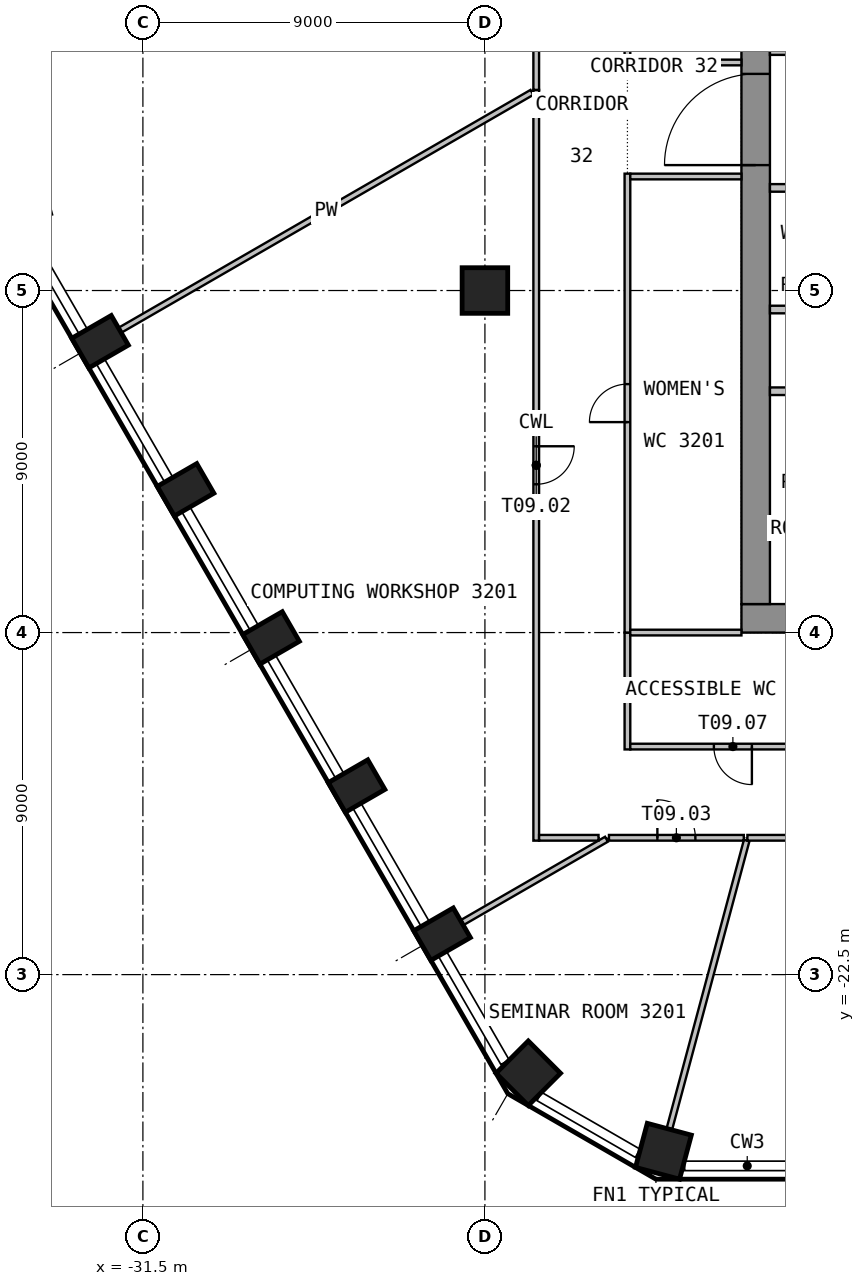
"""IFC4 building model, lengths in metres.
Left out: names, types, materials, properties, quantities, classifications, styles, units other than length and angle.
Written with IfcOpenShell. Run it as: python <this file> out.ifc"""

import sys

from ifc_helpers import new_model, si_unit, direction, frame, frame_2d, origin, origin_2d, place, context, subcontext, project, spatial, rectangle, circle, extrude, element, fill, save


model = new_model("IFC4")
c1 = context("Model", 3, precision=1e-05, world=origin(), true_north=direction((0.0, 1.0)))
c2 = subcontext(c1, "Body", "Model", "MODEL_VIEW")
j1 = project(units=[si_unit("LENGTHUNIT", "METRE"), si_unit("PLANEANGLEUNIT", "RADIAN")], contexts=[c1])
p1 = place(None, origin())
s1 = spatial("IfcSite", under=j1, at=p1, CompositionType="ELEMENT")
p2 = place(p1, origin())
s2 = spatial("IfcBuilding", under=s1, at=p2, CompositionType="ELEMENT")
p3 = place(p2, frame((0.0, 0.0, 132.6)))
s3 = spatial("IfcBuildingStorey", under=s2, at=p3, CompositionType="ELEMENT", Elevation=132.6)
p4 = place(p3, frame((-17.803, -27.148, 0.0), z_axis=(0.0, 0.0, 1.0), x_axis=(0.965925826289, -0.258819045103, 0.0)))
e1 = element("IfcColumn", 1, at=p4, inside=s3, PredefinedType="COLUMN", context=c2, shape_type="SweptSolid", body=[
    extrude(rectangle(XDim=1.2, YDim=1.2, at=origin_2d()), origin(), (0.0, 0.0, 1.0), 3.575),
])
for number, where, z_axis, x_axis in (
    (2, (-32.627, -5.847, 0.0), (0.0, 0.0, 1.0), (0.5, -0.866, 0.0)),
    (3, (-30.377, -9.744, 0.0), (0.0, 0.0, 1.0), (0.5, -0.866, 0.0)),
    (4, (-28.127, -13.641, 0.0), (0.0, 0.0, 1.0), (0.5, -0.866, 0.0)),
    (5, (-25.877, -17.539, 0.0), (0.0, 0.0, 1.0), (0.5, -0.866, 0.0)),
    (6, (-23.627, -21.436, 0.0), (0.0, 0.0, 1.0), (0.5, -0.866, 0.0)),
):
    element("IfcColumn", number, at=place(p3, frame(where, z_axis=z_axis, x_axis=x_axis)), inside=s3, PredefinedType="COLUMN", context=c2, shape_type="SweptSolid", body=[
        extrude(rectangle(XDim=0.9, YDim=1.2, at=origin_2d()), origin(), (0.0, 0.0, 1.0), 3.575),
    ])
p5 = place(p3, frame((-21.359, -25.095, 0.0), z_axis=(0.0, 0.0, 1.0), x_axis=(0.707106781187, -0.707106781187, 0.0)))
e7 = element("IfcColumn", 7, at=p5, inside=s3, PredefinedType="COLUMN", context=c2, shape_type="SweptSolid", body=[
    extrude(rectangle(XDim=1.2, YDim=1.2, at=origin_2d()), origin(), (0.0, 0.0, 1.0), 3.575),
])
p6 = place(p3, frame((-22.5, -4.5, 0.0), z_axis=(0.0, 0.0, 1.0), x_axis=(1.0, 0.0, 0.0)))
e8 = element("IfcColumn", 8, at=p6, inside=s3, PredefinedType="COLUMN", context=c2, shape_type="SweptSolid", body=[
    extrude(circle(Radius=0.6, at=origin_2d()), origin(), (0.0, 0.0, 1.0), 3.575),
])
p7 = place(p3, frame((-15.75, -13.125, 0.0), z_axis=(0.0, 0.0, 1.0), x_axis=(1.0, 0.0, 0.0)))
e9 = element("IfcWall", 9, at=p7, inside=s3, PredefinedType="SHEAR", context=c2, shape_type="SweptSolid", body=[
    extrude(rectangle(XDim=31.5, YDim=0.75, at=frame_2d((15.75, 0.0))), origin(), (0.0, 0.0, 1.0), 3.575),
])
p8 = place(p7, frame((14.55, 0.0, 0.0)))
e10 = element("IfcOpeningElement", 10, at=p8, cuts=e9, PredefinedType="OPENING", context=c2, shape_type="SweptSolid", body=[
    extrude(rectangle(XDim=2.4, YDim=2.1, at=frame_2d((1.2, 1.05))), frame((0.0, 0.385, 0.0), z_axis=(0.0, -1.0, 0.0), x_axis=(1.0, 0.0, 0.0)), (0.0, 0.0, 1.0), 0.77),
])
p9 = place(p7, frame((3.3, 0.0, 0.0)))
e11 = element("IfcOpeningElement", 11, at=p9, cuts=e9, PredefinedType="OPENING", context=c2, shape_type="SweptSolid", body=[
    extrude(rectangle(XDim=1.2, YDim=2.1, at=frame_2d((0.6, 1.05))), frame((0.0, 0.385, 0.0), z_axis=(0.0, -1.0, 0.0), x_axis=(1.0, 0.0, 0.0)), (0.0, 0.0, 1.0), 0.77),
])
p10 = place(p7, frame((27.0, 0.0, 0.0)))
e12 = element("IfcOpeningElement", 12, at=p10, cuts=e9, PredefinedType="OPENING", context=c2, shape_type="SweptSolid", body=[
    extrude(rectangle(XDim=1.2, YDim=2.1, at=frame_2d((0.6, 1.05))), frame((0.0, 0.385, 0.0), z_axis=(0.0, -1.0, 0.0), x_axis=(1.0, 0.0, 0.0)), (0.0, 0.0, 1.0), 0.77),
])
p11 = place(p3, frame((-15.375, -12.75, 0.0), z_axis=(0.0, 0.0, 1.0), x_axis=(0.0, 1.0, 0.0)))
e13 = element("IfcWall", 13, at=p11, inside=s3, PredefinedType="SHEAR", context=c2, shape_type="SweptSolid", body=[
    extrude(rectangle(XDim=25.5, YDim=0.75, at=frame_2d((12.75, 0.0))), origin(), (0.0, 0.0, 1.0), 3.575),
])
p12 = place(p11, frame((11.55, 0.0, 0.0)))
e14 = element("IfcOpeningElement", 14, at=p12, cuts=e13, PredefinedType="OPENING", context=c2, shape_type="SweptSolid", body=[
    extrude(rectangle(XDim=2.4, YDim=2.1, at=frame_2d((1.2, 1.05))), frame((0.0, 0.385, 0.0), z_axis=(0.0, -1.0, 0.0), x_axis=(1.0, 0.0, 0.0)), (0.0, 0.0, 1.0), 0.77),
])
p13 = place(p3, frame((-15.0, 1.8, 0.0), z_axis=(0.0, 0.0, 1.0), x_axis=(1.0, 0.0, 0.0)))
e15 = element("IfcWall", 15, at=p13, inside=s3, PredefinedType="PARTITIONING", context=c2, shape_type="SweptSolid", body=[
    extrude(rectangle(XDim=2.1, YDim=0.2, at=frame_2d((1.05, 0.0))), origin(), (0.0, 0.0, 1.0), 3.575),
])
p14 = place(p3, frame((-15.0, -7.15, 0.0), z_axis=(0.0, 0.0, 1.0), x_axis=(1.0, 0.0, 0.0)))
e16 = element("IfcWall", 16, at=p14, inside=s3, PredefinedType="PARTITIONING", context=c2, shape_type="SweptSolid", body=[
    extrude(rectangle(XDim=2.1, YDim=0.2, at=frame_2d((1.05, 0.0))), origin(), (0.0, 0.0, 1.0), 3.575),
])
p15 = place(p14, frame((0.6, 0.0, 0.0)))
e17 = element("IfcOpeningElement", 17, at=p15, cuts=e16, PredefinedType="OPENING", context=c2, shape_type="SweptSolid", body=[
    extrude(rectangle(XDim=0.9, YDim=2.1, at=frame_2d((0.45, 1.05))), frame((0.0, 0.11, 0.0), z_axis=(0.0, -1.0, 0.0), x_axis=(1.0, 0.0, 0.0)), (0.0, 0.0, 1.0), 0.22),
])
p16 = place(p3, frame((-15.0, -5.0, 0.0), z_axis=(0.0, 0.0, 1.0), x_axis=(1.0, 0.0, 0.0)))
e18 = element("IfcWall", 18, at=p16, inside=s3, PredefinedType="PARTITIONING", context=c2, shape_type="SweptSolid", body=[
    extrude(rectangle(XDim=2.1, YDim=0.2, at=frame_2d((1.05, 0.0))), origin(), (0.0, 0.0, 1.0), 3.575),
])
p17 = place(p16, frame((0.6, 0.0, 0.0)))
e19 = element("IfcOpeningElement", 19, at=p17, cuts=e18, PredefinedType="OPENING", context=c2, shape_type="SweptSolid", body=[
    extrude(rectangle(XDim=0.9, YDim=2.1, at=frame_2d((0.45, 1.05))), frame((0.0, 0.11, 0.0), z_axis=(0.0, -1.0, 0.0), x_axis=(1.0, 0.0, 0.0)), (0.0, 0.0, 1.0), 0.22),
])
p18 = place(p3, frame((-15.0, -1.8, 0.0), z_axis=(0.0, 0.0, 1.0), x_axis=(1.0, 0.0, 0.0)))
e20 = element("IfcWall", 20, at=p18, inside=s3, PredefinedType="PARTITIONING", context=c2, shape_type="SweptSolid", body=[
    extrude(rectangle(XDim=2.1, YDim=0.2, at=frame_2d((1.05, 0.0))), origin(), (0.0, 0.0, 1.0), 3.575),
])
p19 = place(p3, frame((-21.263, 0.714, 0.0), z_axis=(0.0, 0.0, 1.0), x_axis=(-0.866034381457, -0.499984449893, 0.0)))
e21 = element("IfcWall", 21, at=p19, inside=s3, PredefinedType="PARTITIONING", context=c2, shape_type="SweptSolid", body=[
    extrude(rectangle(XDim=12.503, YDim=0.15, at=frame_2d((6.251, 0.0))), origin(), (0.0, 0.0, 1.0), 3.575),
])
p20 = place(p3, frame((-19.301, -18.938, 0.0), z_axis=(0.0, 0.0, 1.0), x_axis=(-0.865968165673, -0.500099126214, 0.0)))
e22 = element("IfcWall", 22, at=p20, inside=s3, PredefinedType="PARTITIONING", context=c2, shape_type="SweptSolid", body=[
    extrude(rectangle(XDim=4.376, YDim=0.15, at=frame_2d((2.188, 0.0))), origin(), (0.0, 0.0, 1.0), 3.575),
])
p21 = place(p3, frame((-21.15, 0.779, 0.0), z_axis=(0.0, 0.0, 1.0), x_axis=(0.0, -1.0, 0.0)))
e23 = element("IfcWall", 23, at=p21, inside=s3, PredefinedType="PARTITIONING", context=c2, shape_type="SweptSolid", body=[
    extrude(rectangle(XDim=19.754, YDim=0.15, at=frame_2d((9.877, 0.0))), origin(), (0.0, 0.0, 1.0), 3.575),
])
p22 = place(p21, frame((9.377, 0.0, 0.0)))
e24 = element("IfcOpeningElement", 24, at=p22, cuts=e23, PredefinedType="OPENING", context=c2, shape_type="SweptSolid", body=[
    extrude(rectangle(XDim=1.0, YDim=2.1, at=frame_2d((0.5, 1.05))), frame((0.0, 0.085, 0.0), z_axis=(0.0, -1.0, 0.0), x_axis=(1.0, 0.0, 0.0)), (0.0, 0.0, 1.0), 0.17),
])
p23 = place(p3, frame((-21.075, -18.9, 0.0), z_axis=(0.0, 0.0, 1.0), x_axis=(1.0, 0.0, 0.0)))
e25 = element("IfcWall", 25, at=p23, inside=s3, PredefinedType="PARTITIONING", context=c2, shape_type="SweptSolid", body=[
    extrude(rectangle(XDim=1.564, YDim=0.15, at=frame_2d((0.782, 0.0))), origin(), (0.0, 0.0, 1.0), 3.575),
])
p24 = place(p3, frame((-21.15, 18.975, 0.0), z_axis=(0.0, 0.0, 1.0), x_axis=(0.0, -1.0, 0.0)))
e26 = element("IfcWall", 26, at=p24, inside=s3, PredefinedType="PARTITIONING", context=c2, shape_type="SweptSolid", body=[
    extrude(rectangle(XDim=18.196, YDim=0.15, at=frame_2d((9.098, 0.0))), origin(), (0.0, 0.0, 1.0), 3.575),
])
p25 = place(p24, frame((8.598, 0.0, 0.0)))
e27 = element("IfcOpeningElement", 27, at=p25, cuts=e26, PredefinedType="OPENING", context=c2, shape_type="SweptSolid", body=[
    extrude(rectangle(XDim=1.0, YDim=2.1, at=frame_2d((0.5, 1.05))), frame((0.0, 0.085, 0.0), z_axis=(0.0, -1.0, 0.0), x_axis=(1.0, 0.0, 0.0)), (0.0, 0.0, 1.0), 0.17),
])
p26 = place(p3, frame((-19.236, -18.9, 0.0), z_axis=(0.0, 0.0, 1.0), x_axis=(1.0, 0.0, 0.0)))
e28 = element("IfcWall", 28, at=p26, inside=s3, PredefinedType="PARTITIONING", context=c2, shape_type="SweptSolid", body=[
    extrude(rectangle(XDim=3.548, YDim=0.15, at=frame_2d((1.774, 0.0))), origin(), (0.0, 0.0, 1.0), 3.575),
])
p27 = place(p26, frame((1.274, 0.0, 0.0)))
e29 = element("IfcOpeningElement", 29, at=p27, cuts=e28, PredefinedType="OPENING", context=c2, shape_type="SweptSolid", body=[
    extrude(rectangle(XDim=1.0, YDim=2.1, at=frame_2d((0.5, 1.05))), frame((0.0, 0.085, 0.0), z_axis=(0.0, -1.0, 0.0), x_axis=(1.0, 0.0, 0.0)), (0.0, 0.0, 1.0), 0.17),
])
p28 = place(p3, frame((-18.75, -16.575, 0.0), z_axis=(0.0, 0.0, 1.0), x_axis=(0.0, 1.0, 0.0)))
e30 = element("IfcWall", 30, at=p28, inside=s3, PredefinedType="PARTITIONING", context=c2, shape_type="SweptSolid", body=[
    extrude(rectangle(XDim=3.075, YDim=0.15, at=frame_2d((1.538, 0.0))), origin(), (0.0, 0.0, 1.0), 3.575),
])
p29 = place(p3, frame((-13.275, -16.5, 0.0), z_axis=(0.0, 0.0, 1.0), x_axis=(-1.0, 0.0, 0.0)))
e31 = element("IfcWall", 31, at=p29, inside=s3, PredefinedType="PARTITIONING", context=c2, shape_type="SweptSolid", body=[
    extrude(rectangle(XDim=5.4, YDim=0.15, at=frame_2d((2.7, 0.0))), origin(), (0.0, 0.0, 1.0), 3.575),
])
p30 = place(p29, frame((2.2, 0.0, 0.0)))
e32 = element("IfcOpeningElement", 32, at=p30, cuts=e31, PredefinedType="OPENING", context=c2, shape_type="SweptSolid", body=[
    extrude(rectangle(XDim=1.0, YDim=2.1, at=frame_2d((0.5, 1.05))), frame((0.0, 0.085, 0.0), z_axis=(0.0, -1.0, 0.0), x_axis=(1.0, 0.0, 0.0)), (0.0, 0.0, 1.0), 0.17),
])
p31 = place(p3, frame((-18.75, -13.5, 0.0), z_axis=(0.0, 0.0, 1.0), x_axis=(0.0, 1.0, 0.0)))
e33 = element("IfcWall", 33, at=p31, inside=s3, PredefinedType="PARTITIONING", context=c2, shape_type="SweptSolid", body=[
    extrude(rectangle(XDim=12.075, YDim=0.15, at=frame_2d((6.038, 0.0))), origin(), (0.0, 0.0, 1.0), 3.575),
])
p32 = place(p31, frame((5.538, 0.0, 0.0)))
e34 = element("IfcOpeningElement", 34, at=p32, cuts=e33, PredefinedType="OPENING", context=c2, shape_type="SweptSolid", body=[
    extrude(rectangle(XDim=1.0, YDim=2.1, at=frame_2d((0.5, 1.05))), frame((0.0, 0.085, 0.0), z_axis=(0.0, -1.0, 0.0), x_axis=(1.0, 0.0, 0.0)), (0.0, 0.0, 1.0), 0.17),
])
for number, where, z_axis, x_axis in (
    (35, (-15.75, -13.5, 0.0), (0.0, 0.0, 1.0), (-1.0, 0.0, 0.0)),
    (36, (-18.675, -1.5, 0.0), (0.0, 0.0, 1.0), (1.0, 0.0, 0.0)),
):
    element("IfcWall", number, at=place(p3, frame(where, z_axis=z_axis, x_axis=x_axis)), inside=s3, PredefinedType="PARTITIONING", context=c2, shape_type="SweptSolid", body=[
        extrude(rectangle(XDim=2.925, YDim=0.15, at=frame_2d((1.462, 0.0))), origin(), (0.0, 0.0, 1.0), 3.575),
    ])
p33 = place(p3, frame((-18.75, 1.425, 0.0), z_axis=(0.0, 0.0, 1.0), x_axis=(0.0, 1.0, 0.0)))
e37 = element("IfcWall", 37, at=p33, inside=s3, PredefinedType="PARTITIONING", context=c2, shape_type="SweptSolid", body=[
    extrude(rectangle(XDim=12.075, YDim=0.15, at=frame_2d((6.038, 0.0))), origin(), (0.0, 0.0, 1.0), 3.575),
])
p34 = place(p33, frame((5.538, 0.0, 0.0)))
e38 = element("IfcOpeningElement", 38, at=p34, cuts=e37, PredefinedType="OPENING", context=c2, shape_type="SweptSolid", body=[
    extrude(rectangle(XDim=1.0, YDim=2.1, at=frame_2d((0.5, 1.05))), frame((0.0, 0.085, 0.0), z_axis=(0.0, -1.0, 0.0), x_axis=(1.0, 0.0, 0.0)), (0.0, 0.0, 1.0), 0.17),
])
p35 = place(p3, frame((-15.75, 1.5, 0.0), z_axis=(0.0, 0.0, 1.0), x_axis=(-1.0, 0.0, 0.0)))
e39 = element("IfcWall", 39, at=p35, inside=s3, PredefinedType="PARTITIONING", context=c2, shape_type="SweptSolid", body=[
    extrude(rectangle(XDim=2.925, YDim=0.15, at=frame_2d((1.462, 0.0))), origin(), (0.0, 0.0, 1.0), 3.575),
])
p36 = place(p3, frame((-15.612, -18.972, 0.0), z_axis=(0.0, 0.0, 1.0), x_axis=(-0.258869363255, -0.965912342176, 0.0)))
e40 = element("IfcWall", 40, at=p36, inside=s3, PredefinedType="PARTITIONING", context=c2, shape_type="SweptSolid", body=[
    extrude(rectangle(XDim=7.844, YDim=0.15, at=frame_2d((3.922, 0.0))), origin(), (0.0, 0.0, 1.0), 3.575),
])
p37 = place(p3, frame((-15.593, -18.9, 0.0), z_axis=(0.0, 0.0, 1.0), x_axis=(1.0, 0.0, 0.0)))
e41 = element("IfcWall", 41, at=p37, inside=s3, PredefinedType="PARTITIONING", context=c2, shape_type="SweptSolid", body=[
    extrude(rectangle(XDim=11.093, YDim=0.15, at=frame_2d((5.546, 0.0))), origin(), (0.0, 0.0, 1.0), 3.575),
])
p38 = place(p37, frame((5.046, 0.0, 0.0)))
e42 = element("IfcOpeningElement", 42, at=p38, cuts=e41, PredefinedType="OPENING", context=c2, shape_type="SweptSolid", body=[
    extrude(rectangle(XDim=1.0, YDim=2.1, at=frame_2d((0.5, 1.05))), frame((0.0, 0.085, 0.0), z_axis=(0.0, -1.0, 0.0), x_axis=(1.0, 0.0, 0.0)), (0.0, 0.0, 1.0), 0.17),
])
p39 = place(p12, origin())
e43 = element("IfcDoor", 43, at=p39, inside=s3, OperationType="DOUBLE_DOOR_DOUBLE_SWING", PredefinedType="DOOR", context=c2, shape_type="SweptSolid", body=[
    extrude(rectangle(XDim=2.4, YDim=2.1, at=frame_2d((1.2, 1.05))), frame((0.0, 0.025, 0.0), z_axis=(0.0, -1.0, 0.0), x_axis=(1.0, 0.0, 0.0)), (0.0, 0.0, 1.0), 0.05),
])
fill(e14, e43)
p40 = place(p22, origin())
e44 = element("IfcDoor", 44, at=p40, inside=s3, OperationType="SINGLE_SWING_RIGHT", PredefinedType="DOOR", context=c2, shape_type="SweptSolid", body=[
    extrude(rectangle(XDim=1.0, YDim=2.1, at=frame_2d((0.5, 1.05))), frame((0.0, 0.025, 0.0), z_axis=(0.0, -1.0, 0.0), x_axis=(1.0, 0.0, 0.0)), (0.0, 0.0, 1.0), 0.05),
])
fill(e24, e44)
p41 = place(p27, origin())
e45 = element("IfcDoor", 45, at=p41, inside=s3, OperationType="SINGLE_SWING_LEFT", PredefinedType="DOOR", context=c2, shape_type="SweptSolid", body=[
    extrude(rectangle(XDim=1.0, YDim=2.1, at=frame_2d((0.5, 1.05))), frame((0.0, 0.025, 0.0), z_axis=(0.0, -1.0, 0.0), x_axis=(1.0, 0.0, 0.0)), (0.0, 0.0, 1.0), 0.05),
])
fill(e29, e45)
p42 = place(p32, origin())
e46 = element("IfcDoor", 46, at=p42, inside=s3, OperationType="SINGLE_SWING_RIGHT", PredefinedType="DOOR", context=c2, shape_type="SweptSolid", body=[
    extrude(rectangle(XDim=1.0, YDim=2.1, at=frame_2d((0.5, 1.05))), frame((0.0, 0.025, 0.0), z_axis=(0.0, -1.0, 0.0), x_axis=(1.0, 0.0, 0.0)), (0.0, 0.0, 1.0), 0.05),
])
fill(e34, e46)
p43 = place(p30, origin())
e47 = element("IfcDoor", 47, at=p43, inside=s3, OperationType="SINGLE_SWING_RIGHT", PredefinedType="DOOR", context=c2, shape_type="SweptSolid", body=[
    extrude(rectangle(XDim=1.0, YDim=2.1, at=frame_2d((0.5, 1.05))), frame((0.0, 0.025, 0.0), z_axis=(0.0, -1.0, 0.0), x_axis=(1.0, 0.0, 0.0)), (0.0, 0.0, 1.0), 0.05),
])
fill(e32, e47)
save(model, sys.argv[1])
